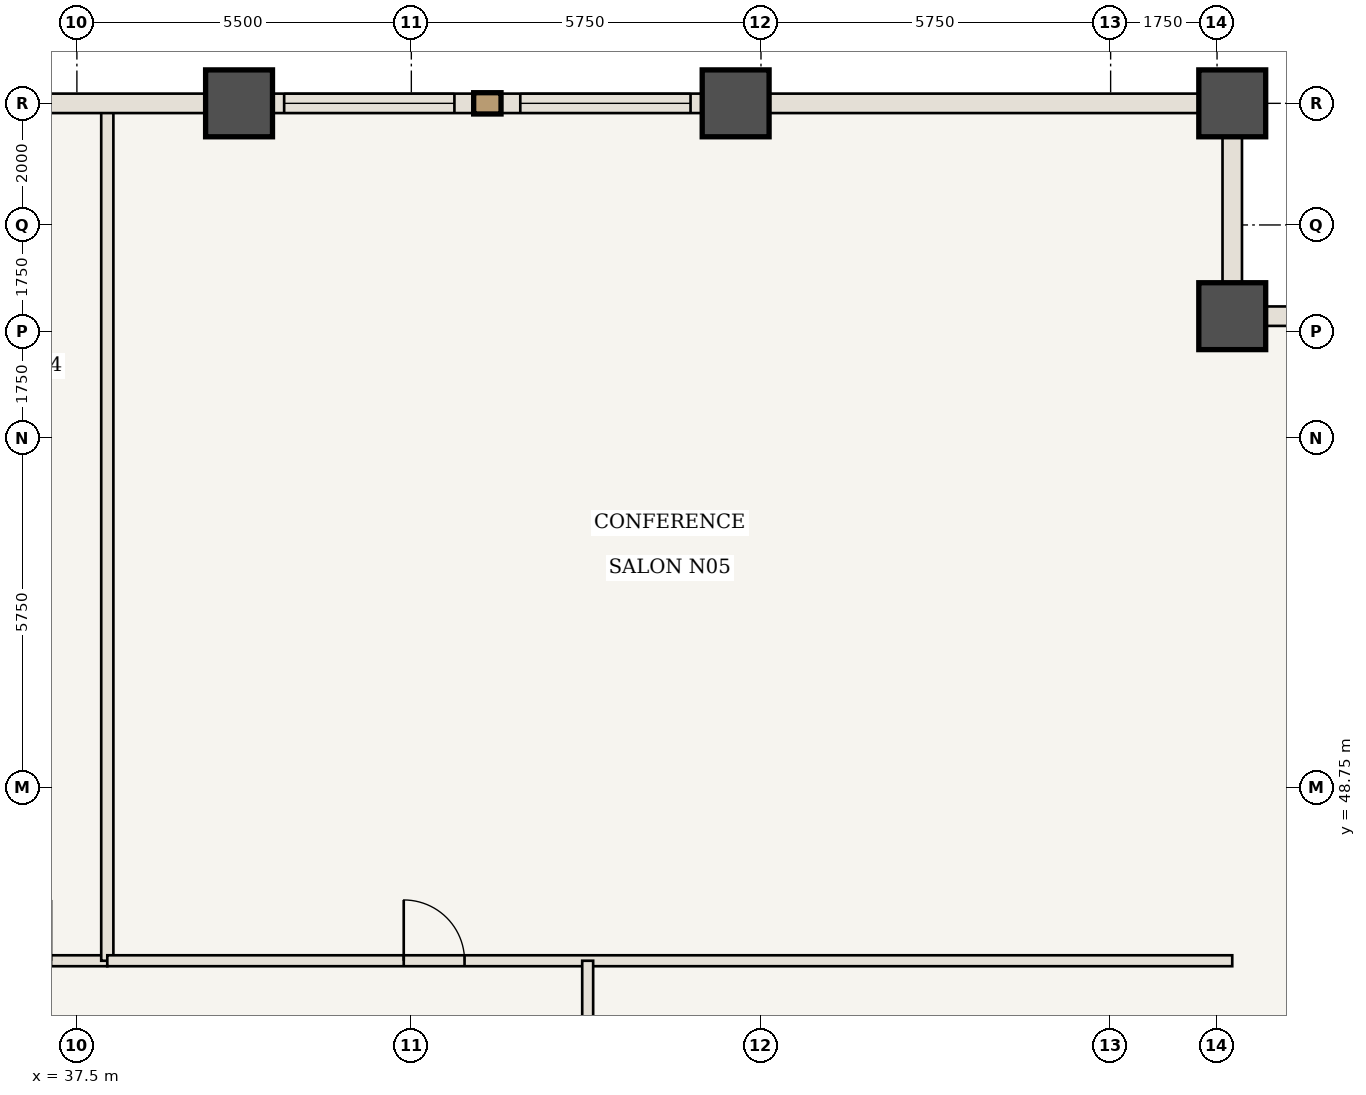
"""IFC4 building model, lengths in metres.
Left out: names, types, materials, properties, quantities, classifications, styles, units other than length and angle.
Written with IfcOpenShell. Run it as: python <this file> out.ifc"""

import sys

from ifc_helpers import new_model, si_unit, direction, frame, frame_2d, origin, origin_2d, place, context, subcontext, project, spatial, rectangle, extrude, element, fill, save


model = new_model("IFC4")
c1 = context("Model", 3, precision=1e-05, world=origin(), true_north=direction((0.0, 1.0)))
c2 = subcontext(c1, "Body", "Model", "MODEL_VIEW")
j1 = project(units=[si_unit("LENGTHUNIT", "METRE"), si_unit("PLANEANGLEUNIT", "RADIAN")], contexts=[c1])
p1 = place(None, origin())
s1 = spatial("IfcSite", under=j1, at=p1, CompositionType="ELEMENT")
p2 = place(p1, origin())
s2 = spatial("IfcBuilding", under=s1, at=p2, CompositionType="ELEMENT")
p3 = place(p2, frame((0.0, 0.0, 52.85)))
s3 = spatial("IfcBuildingStorey", under=s2, at=p3, CompositionType="ELEMENT", Elevation=52.85)
for number, where, z_axis, x_axis in (
    (1, (56.5, 56.5, 0.0), (0.0, 0.0, 1.0), (1.0, 0.0, 0.0)),
    (2, (56.5, 60.0, 0.0), (0.0, 0.0, 1.0), (1.0, 0.0, 0.0)),
    (3, (40.167, 60.0, 0.0), (0.0, 0.0, 1.0), (1.0, 0.0, 0.0)),
    (4, (48.333, 60.0, 0.0), (0.0, 0.0, 1.0), (1.0, 0.0, 0.0)),
):
    element("IfcColumn", number, at=place(p3, frame(where, z_axis=z_axis, x_axis=x_axis)), inside=s3, PredefinedType="COLUMN", context=c2, shape_type="SweptSolid", body=[
        extrude(rectangle(XDim=1.1, YDim=1.1, at=origin_2d()), origin(), (0.0, 0.0, 1.0), 3.5),
    ])
p4 = place(p3, frame((33.3, 45.9, 0.0), z_axis=(0.0, 0.0, 1.0), x_axis=(1.0, 0.0, 0.0)))
e5 = element("IfcWall", 5, at=p4, inside=s3, PredefinedType="STANDARD", context=c2, shape_type="SweptSolid", body=[
    extrude(rectangle(XDim=4.7, YDim=0.18, at=frame_2d((2.35, 0.0))), origin(), (0.0, 0.0, 1.0), 3.32),
])
p5 = place(p4, frame((2.775, 0.0, 0.0)))
e6 = element("IfcOpeningElement", 6, at=p5, cuts=e5, PredefinedType="OPENING", context=c2, shape_type="SweptSolid", body=[
    extrude(rectangle(XDim=1.0, YDim=2.15, at=frame_2d((0.5, 1.075))), frame((0.0, 0.1, 0.0), z_axis=(0.0, -1.0, 0.0), x_axis=(1.0, 0.0, 0.0)), (0.0, 0.0, 1.0), 0.2),
])
p6 = place(p3, frame((38.0, 45.9, 0.0), z_axis=(0.0, 0.0, 1.0), x_axis=(0.0, 1.0, 0.0)))
e7 = element("IfcWall", 7, at=p6, inside=s3, PredefinedType="STANDARD", context=c2, shape_type="SweptSolid", body=[
    extrude(rectangle(XDim=14.04, YDim=0.2, at=frame_2d((7.02, 0.0))), origin(), (0.0, 0.0, 1.0), 3.32),
])
p7 = place(p3, frame((38.0, 45.9, 0.0), z_axis=(0.0, 0.0, 1.0), x_axis=(1.0, 0.0, 0.0)))
e8 = element("IfcWall", 8, at=p7, inside=s3, PredefinedType="STANDARD", context=c2, shape_type="SweptSolid", body=[
    extrude(rectangle(XDim=18.5, YDim=0.18, at=frame_2d((9.25, 0.0))), origin(), (0.0, 0.0, 1.0), 3.32),
])
p8 = place(p7, frame((4.875, 0.0, 0.0)))
e9 = element("IfcOpeningElement", 9, at=p8, cuts=e8, PredefinedType="OPENING", context=c2, shape_type="SweptSolid", body=[
    extrude(rectangle(XDim=1.0, YDim=2.15, at=frame_2d((0.5, 1.075))), frame((0.0, 0.1, 0.0), z_axis=(0.0, -1.0, 0.0), x_axis=(1.0, 0.0, 0.0)), (0.0, 0.0, 1.0), 0.2),
])
p9 = place(p3, frame((45.9, 37.6, 0.0), z_axis=(0.0, 0.0, 1.0), x_axis=(0.0, 1.0, 0.0)))
e10 = element("IfcWall", 10, at=p9, inside=s3, PredefinedType="STANDARD", context=c2, shape_type="SweptSolid", body=[
    extrude(rectangle(XDim=8.3, YDim=0.18, at=frame_2d((4.15, 0.0))), origin(), (0.0, 0.0, 1.0), 3.32),
])
p10 = place(p9, frame((3.65, 0.0, 0.0)))
e11 = element("IfcOpeningElement", 11, at=p10, cuts=e10, PredefinedType="OPENING", context=c2, shape_type="SweptSolid", body=[
    extrude(rectangle(XDim=1.0, YDim=2.15, at=frame_2d((0.5, 1.075))), frame((0.0, 0.1, 0.0), z_axis=(0.0, -1.0, 0.0), x_axis=(1.0, 0.0, 0.0)), (0.0, 0.0, 1.0), 0.2),
])
p11 = place(p3, frame((32.0, 60.0, 0.0), z_axis=(0.0, 0.0, 1.0), x_axis=(1.0, 0.0, 0.0)))
e12 = element("IfcWall", 12, at=p11, inside=s3, PredefinedType="USERDEFINED", context=c2, shape_type="SweptSolid", body=[
    extrude(rectangle(XDim=8.167, YDim=0.32, at=frame_2d((4.083, 0.0))), origin(), (0.0, 0.0, 1.0), 2.52),
])
p12 = place(p11, frame((2.45, 0.0, 0.85)))
e13 = element("IfcOpeningElement", 13, at=p12, cuts=e12, PredefinedType="OPENING", context=c2, shape_type="SweptSolid", body=[
    extrude(rectangle(XDim=2.4, YDim=1.47, at=frame_2d((1.2, 0.735))), frame((0.0, 0.17, 0.0), z_axis=(0.0, -1.0, 0.0), x_axis=(1.0, 0.0, 0.0)), (0.0, 0.0, 1.0), 0.34),
])
p13 = place(p3, frame((40.167, 60.0, 0.0), z_axis=(0.0, 0.0, 1.0), x_axis=(1.0, 0.0, 0.0)))
e14 = element("IfcWall", 14, at=p13, inside=s3, PredefinedType="USERDEFINED", context=c2, shape_type="SweptSolid", body=[
    extrude(rectangle(XDim=8.167, YDim=0.32, at=frame_2d((4.083, 0.0))), origin(), (0.0, 0.0, 1.0), 2.52),
])
p14 = place(p13, frame((0.742, 0.0, 0.85)))
e15 = element("IfcOpeningElement", 15, at=p14, cuts=e14, PredefinedType="OPENING", context=c2, shape_type="SweptSolid", body=[
    extrude(rectangle(XDim=2.8, YDim=1.47, at=frame_2d((1.4, 0.735))), frame((0.0, 0.17, 0.0), z_axis=(0.0, -1.0, 0.0), x_axis=(1.0, 0.0, 0.0)), (0.0, 0.0, 1.0), 0.34),
])
p15 = place(p13, frame((4.625, 0.0, 0.85)))
e16 = element("IfcOpeningElement", 16, at=p15, cuts=e14, PredefinedType="OPENING", context=c2, shape_type="SweptSolid", body=[
    extrude(rectangle(XDim=2.8, YDim=1.47, at=frame_2d((1.4, 0.735))), frame((0.0, 0.17, 0.0), z_axis=(0.0, -1.0, 0.0), x_axis=(1.0, 0.0, 0.0)), (0.0, 0.0, 1.0), 0.34),
])
p16 = place(p3, frame((48.333, 60.0, 0.0), z_axis=(0.0, 0.0, 1.0), x_axis=(1.0, 0.0, 0.0)))
e17 = element("IfcWall", 17, at=p16, inside=s3, PredefinedType="USERDEFINED", context=c2, shape_type="SweptSolid", body=[
    extrude(rectangle(XDim=8.167, YDim=0.32, at=frame_2d((4.083, 0.0))), origin(), (0.0, 0.0, 1.0), 2.52),
])
for number, where, z_axis, x_axis in (
    (18, (56.5, 56.5, 0.0), (0.0, 0.0, 1.0), (1.0, 0.0, 0.0)),
    (19, (56.5, 60.0, 0.0), (0.0, 0.0, 1.0), (0.0, -1.0, 0.0)),
):
    element("IfcWall", number, at=place(p3, frame(where, z_axis=z_axis, x_axis=x_axis)), inside=s3, PredefinedType="USERDEFINED", context=c2, shape_type="SweptSolid", body=[
        extrude(rectangle(XDim=3.5, YDim=0.32, at=frame_2d((1.75, 0.0))), origin(), (0.0, 0.0, 1.0), 2.52),
    ])
p17 = place(p8, origin())
e20 = element("IfcDoor", 20, at=p17, inside=s3, OperationType="SINGLE_SWING_LEFT", PredefinedType="DOOR", context=c2, shape_type="SweptSolid", body=[
    extrude(rectangle(XDim=1.0, YDim=2.15, at=frame_2d((0.5, 1.075))), frame((0.0, 0.025, 0.0), z_axis=(0.0, -1.0, 0.0), x_axis=(1.0, 0.0, 0.0)), (0.0, 0.0, 1.0), 0.05),
])
fill(e9, e20)
p18 = place(p14, origin())
e21 = element("IfcWindow", 21, at=p18, inside=s3, PartitioningType="SINGLE_PANEL", PredefinedType="WINDOW", context=c2, shape_type="SweptSolid", body=[
    extrude(rectangle(XDim=2.8, YDim=1.47, at=frame_2d((1.4, 0.735))), frame((0.0, 0.03, 0.0), z_axis=(0.0, -1.0, 0.0), x_axis=(1.0, 0.0, 0.0)), (0.0, 0.0, 1.0), 0.06),
])
fill(e15, e21)
p19 = place(p15, origin())
e22 = element("IfcWindow", 22, at=p19, inside=s3, PartitioningType="SINGLE_PANEL", PredefinedType="WINDOW", context=c2, shape_type="SweptSolid", body=[
    extrude(rectangle(XDim=2.8, YDim=1.47, at=frame_2d((1.4, 0.735))), frame((0.0, 0.03, 0.0), z_axis=(0.0, -1.0, 0.0), x_axis=(1.0, 0.0, 0.0)), (0.0, 0.0, 1.0), 0.06),
])
fill(e16, e22)
save(model, sys.argv[1])
